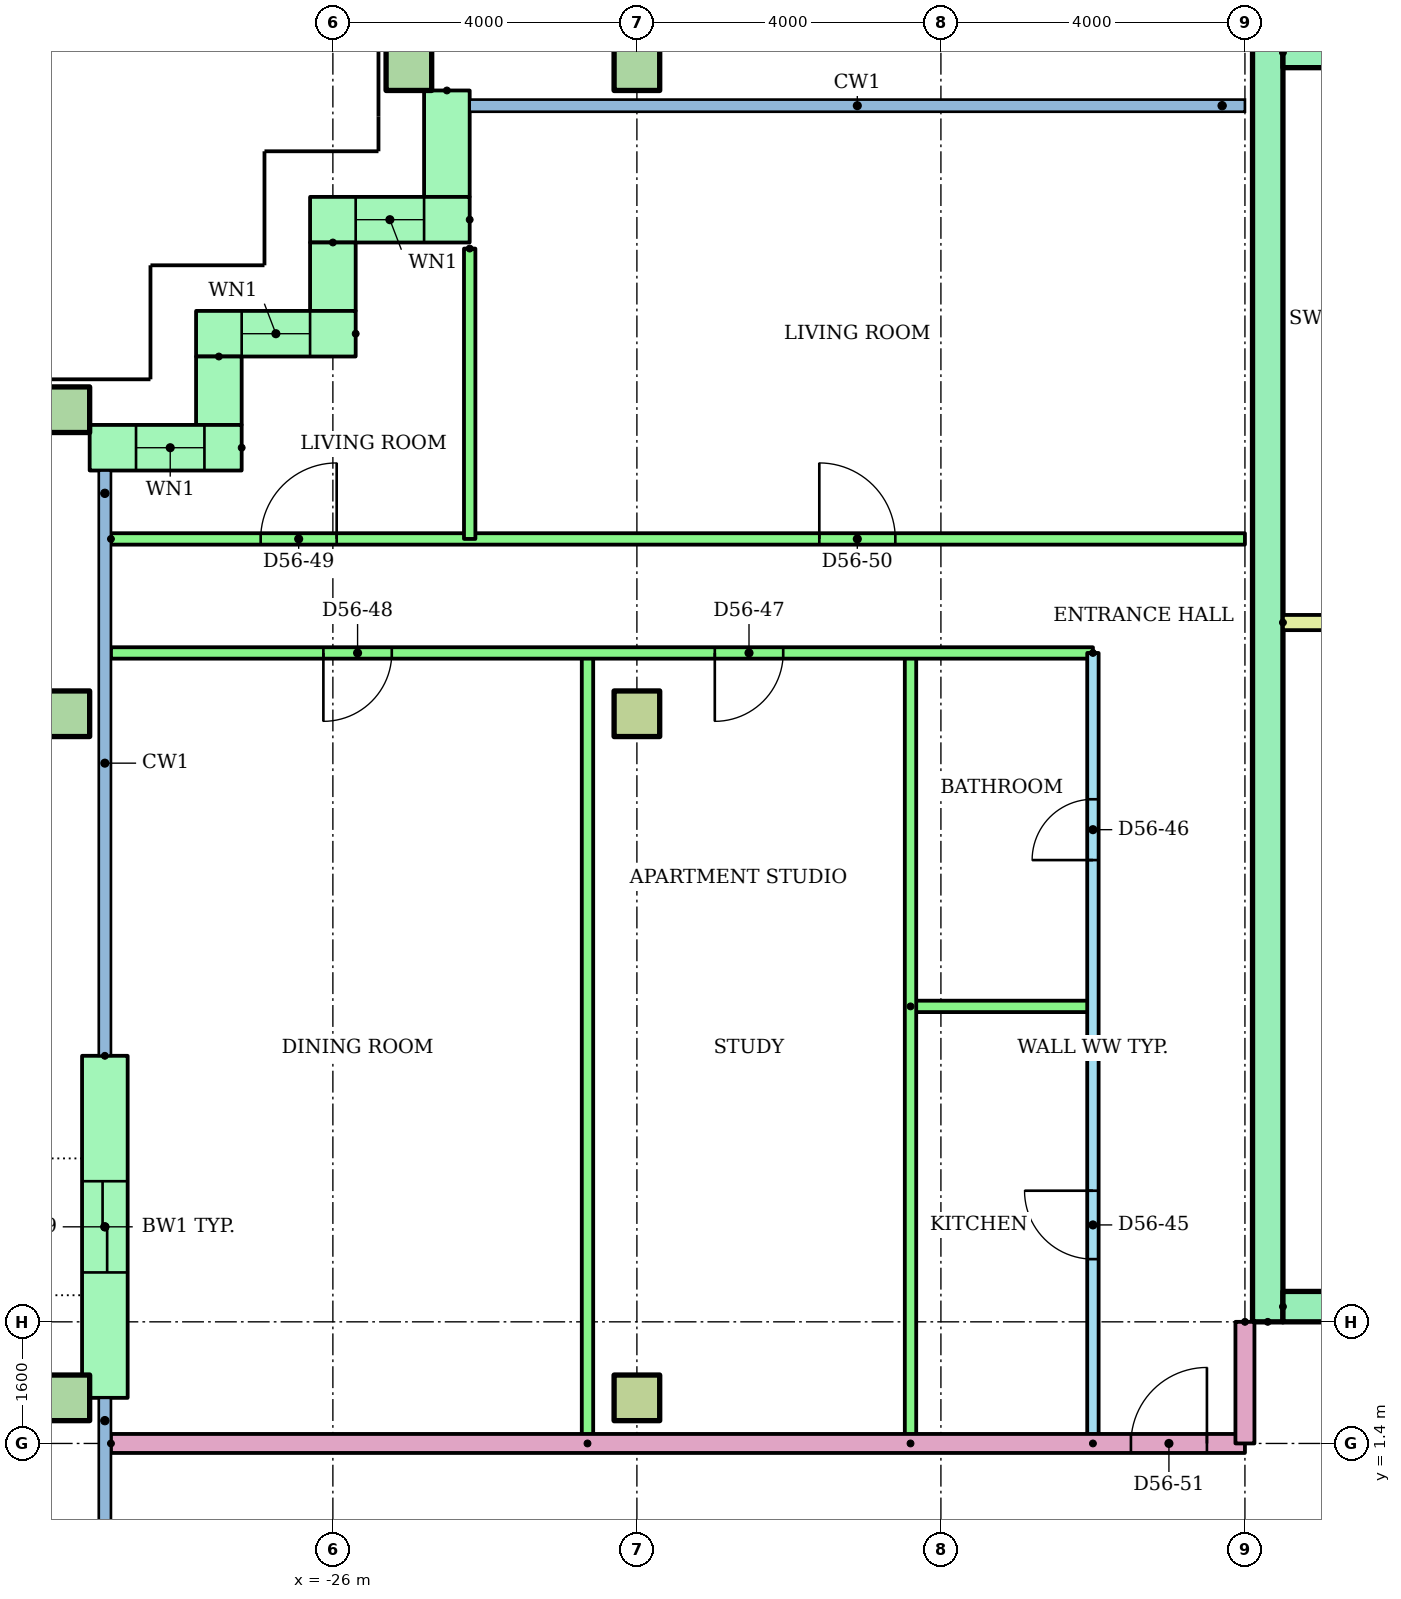
"""IFC4 building model, lengths in metres.
Left out: names, types, materials, properties, quantities, classifications, styles, units other than length and angle.
Written with IfcOpenShell. Run it as: python <this file> out.ifc"""

import sys

from ifc_helpers import new_model, si_unit, direction, frame, frame_2d, origin, origin_2d, place, context, subcontext, project, spatial, rectangle, hollow_rectangle, extrude, element, fill, save


model = new_model("IFC4")
c1 = context("Model", 3, precision=1e-05, world=origin(), true_north=direction((0.0, 1.0)))
c2 = subcontext(c1, "Body", "Model", "MODEL_VIEW")
j1 = project(units=[si_unit("LENGTHUNIT", "METRE"), si_unit("PLANEANGLEUNIT", "RADIAN")], contexts=[c1])
p1 = place(None, origin())
s1 = spatial("IfcSite", under=j1, at=p1, CompositionType="ELEMENT")
p2 = place(p1, origin())
s2 = spatial("IfcBuilding", under=s1, at=p2, CompositionType="ELEMENT")
p3 = place(p2, frame((0.0, 0.0, 217.2)))
s3 = spatial("IfcBuildingStorey", under=s2, at=p3, CompositionType="ELEMENT", Elevation=217.2)
p4 = place(p3, frame((-29.5, 2.0, 0.0)))
e1 = element("IfcColumn", 1, at=p4, inside=s3, PredefinedType="COLUMN", context=c2, shape_type="SweptSolid", body=[
    extrude(hollow_rectangle(XDim=0.6, YDim=0.6, WallThickness=0.03, at=origin_2d()), origin(), (0.0, 0.0, 1.0), 3.2),
])
p5 = place(p3, frame((-22.0, 2.0, 0.0)))
e2 = element("IfcColumn", 2, at=p5, inside=s3, PredefinedType="COLUMN", context=c2, shape_type="SweptSolid", body=[
    extrude(rectangle(XDim=0.6, YDim=0.6, at=origin_2d()), origin(), (0.0, 0.0, 1.0), 3.2),
])
p6 = place(p3, frame((-29.5, 11.0, 0.0)))
e3 = element("IfcColumn", 3, at=p6, inside=s3, PredefinedType="COLUMN", context=c2, shape_type="SweptSolid", body=[
    extrude(hollow_rectangle(XDim=0.6, YDim=0.6, WallThickness=0.03, at=origin_2d()), origin(), (0.0, 0.0, 1.0), 3.2),
])
p7 = place(p3, frame((-22.0, 11.0, 0.0)))
e4 = element("IfcColumn", 4, at=p7, inside=s3, PredefinedType="COLUMN", context=c2, shape_type="SweptSolid", body=[
    extrude(rectangle(XDim=0.6, YDim=0.6, at=origin_2d()), origin(), (0.0, 0.0, 1.0), 3.2),
])
for number, where in (
    (5, (-29.5, 15.0, 0.0)),
    (6, (-25.0, 19.5, 0.0)),
    (7, (-22.0, 19.5, 0.0)),
):
    element("IfcColumn", number, at=place(p3, frame(where)), inside=s3, PredefinedType="COLUMN", context=c2, shape_type="SweptSolid", body=[
        extrude(hollow_rectangle(XDim=0.6, YDim=0.6, WallThickness=0.03, at=origin_2d()), origin(), (0.0, 0.0, 1.0), 3.2),
    ])
p8 = place(p3, frame((-24.5, 19.2, 0.0), z_axis=(0.0, 0.0, 1.0), x_axis=(0.0, -1.0, 0.0)))
e8 = element("IfcWall", 8, at=p8, inside=s3, PredefinedType="STANDARD", context=c2, shape_type="SweptSolid", body=[
    extrude(rectangle(XDim=1.4, YDim=0.6, at=frame_2d((0.7, 0.0))), origin(), (0.0, 0.0, 1.0), 2.92),
])
p9 = place(p3, frame((-24.2, 17.5, 0.0), z_axis=(0.0, 0.0, 1.0), x_axis=(-1.0, 0.0, 0.0)))
e9 = element("IfcWall", 9, at=p9, inside=s3, PredefinedType="STANDARD", context=c2, shape_type="SweptSolid", body=[
    extrude(rectangle(XDim=2.1, YDim=0.6, at=frame_2d((1.05, 0.0))), origin(), (0.0, 0.0, 1.0), 2.92),
])
p10 = place(p9, frame((0.6, 0.0, 0.9)))
e10 = element("IfcOpeningElement", 10, at=p10, cuts=e9, PredefinedType="OPENING", context=c2, shape_type="SweptSolid", body=[
    extrude(rectangle(XDim=0.9, YDim=1.5, at=frame_2d((0.45, 0.75))), frame((0.0, 0.31, 0.0), z_axis=(0.0, -1.0, 0.0), x_axis=(1.0, 0.0, 0.0)), (0.0, 0.0, 1.0), 0.62),
])
p11 = place(p3, frame((-26.0, 17.2, 0.0), z_axis=(0.0, 0.0, 1.0), x_axis=(0.0, -1.0, 0.0)))
e11 = element("IfcWall", 11, at=p11, inside=s3, PredefinedType="STANDARD", context=c2, shape_type="SweptSolid", body=[
    extrude(rectangle(XDim=0.9, YDim=0.6, at=frame_2d((0.45, 0.0))), origin(), (0.0, 0.0, 1.0), 2.92),
])
p12 = place(p3, frame((-25.7, 16.0, 0.0), z_axis=(0.0, 0.0, 1.0), x_axis=(-1.0, 0.0, 0.0)))
e12 = element("IfcWall", 12, at=p12, inside=s3, PredefinedType="STANDARD", context=c2, shape_type="SweptSolid", body=[
    extrude(rectangle(XDim=2.1, YDim=0.6, at=frame_2d((1.05, 0.0))), origin(), (0.0, 0.0, 1.0), 2.92),
])
p13 = place(p12, frame((0.6, 0.0, 0.9)))
e13 = element("IfcOpeningElement", 13, at=p13, cuts=e12, PredefinedType="OPENING", context=c2, shape_type="SweptSolid", body=[
    extrude(rectangle(XDim=0.9, YDim=1.5, at=frame_2d((0.45, 0.75))), frame((0.0, 0.31, 0.0), z_axis=(0.0, -1.0, 0.0), x_axis=(1.0, 0.0, 0.0)), (0.0, 0.0, 1.0), 0.62),
])
p14 = place(p3, frame((-27.5, 15.7, 0.0), z_axis=(0.0, 0.0, 1.0), x_axis=(0.0, -1.0, 0.0)))
e14 = element("IfcWall", 14, at=p14, inside=s3, PredefinedType="STANDARD", context=c2, shape_type="SweptSolid", body=[
    extrude(rectangle(XDim=0.9, YDim=0.6, at=frame_2d((0.45, 0.0))), origin(), (0.0, 0.0, 1.0), 2.92),
])
p15 = place(p3, frame((-27.2, 14.5, 0.0), z_axis=(0.0, 0.0, 1.0), x_axis=(-1.0, 0.0, 0.0)))
e15 = element("IfcWall", 15, at=p15, inside=s3, PredefinedType="STANDARD", context=c2, shape_type="SweptSolid", body=[
    extrude(rectangle(XDim=2.0, YDim=0.6, at=frame_2d((1.0, 0.0))), origin(), (0.0, 0.0, 1.0), 2.92),
])
p16 = place(p15, frame((0.49, 0.0, 0.9)))
e16 = element("IfcOpeningElement", 16, at=p16, cuts=e15, PredefinedType="OPENING", context=c2, shape_type="SweptSolid", body=[
    extrude(rectangle(XDim=0.9, YDim=1.5, at=frame_2d((0.45, 0.75))), frame((0.0, 0.31, 0.0), z_axis=(0.0, -1.0, 0.0), x_axis=(1.0, 0.0, 0.0)), (0.0, 0.0, 1.0), 0.62),
])
p17 = place(p3, frame((-29.0, 6.5, 0.0), z_axis=(0.0, 0.0, 1.0), x_axis=(0.0, -1.0, 0.0)))
e17 = element("IfcWall", 17, at=p17, inside=s3, PredefinedType="STANDARD", context=c2, shape_type="SweptSolid", body=[
    extrude(rectangle(XDim=4.5, YDim=0.6, at=frame_2d((2.25, 0.0))), origin(), (0.0, 0.0, 1.0), 2.92),
])
p18 = place(p17, frame((1.65, 0.0, 0.0)))
e18 = element("IfcOpeningElement", 18, at=p18, cuts=e17, PredefinedType="OPENING", context=c2, shape_type="SweptSolid", body=[
    extrude(rectangle(XDim=1.2, YDim=2.1, at=frame_2d((0.6, 1.05))), frame((0.0, 0.31, 0.0), z_axis=(0.0, -1.0, 0.0), x_axis=(1.0, 0.0, 0.0)), (0.0, 0.0, 1.0), 0.62),
])
p19 = place(p3, frame((-13.7, 3.0, 0.0), z_axis=(0.0, 0.0, 1.0), x_axis=(0.0, 1.0, 0.0)))
e19 = element("IfcWall", 19, at=p19, inside=s3, PredefinedType="SHEAR", context=c2, shape_type="SweptSolid", body=[
    extrude(rectangle(XDim=17.0, YDim=0.4, at=frame_2d((8.5, 0.0))), origin(), (0.0, 0.0, 1.0), 2.92),
])
p20 = place(p3, frame((-13.5, 19.7, 0.0)))
e20 = element("IfcWall", 20, at=p20, inside=s3, PredefinedType="SHEAR", context=c2, shape_type="SweptSolid", body=[
    extrude(rectangle(XDim=27.0, YDim=0.4, at=frame_2d((13.5, 0.0))), origin(), (0.0, 0.0, 1.0), 2.92),
])
p21 = place(p3, frame((-13.5, 3.2, 0.0)))
e21 = element("IfcWall", 21, at=p21, inside=s3, PredefinedType="SHEAR", context=c2, shape_type="SweptSolid", body=[
    extrude(rectangle(XDim=27.0, YDim=0.4, at=frame_2d((13.5, 0.0))), origin(), (0.0, 0.0, 1.0), 2.92),
])
p22 = place(p21, frame((22.083, 0.0, 0.0)))
e22 = element("IfcOpeningElement", 22, at=p22, cuts=e21, PredefinedType="OPENING", context=c2, shape_type="SweptSolid", body=[
    extrude(rectangle(XDim=1.1, YDim=2.1, at=frame_2d((0.55, 1.05))), frame((0.0, 0.21, 0.0), z_axis=(0.0, -1.0, 0.0), x_axis=(1.0, 0.0, 0.0)), (0.0, 0.0, 1.0), 0.42),
])
p23 = place(p21, frame((25.128, 0.0, 0.0)))
e23 = element("IfcOpeningElement", 23, at=p23, cuts=e21, PredefinedType="OPENING", context=c2, shape_type="SweptSolid", body=[
    extrude(rectangle(XDim=1.1, YDim=2.1, at=frame_2d((0.55, 1.05))), frame((0.0, 0.21, 0.0), z_axis=(0.0, -1.0, 0.0), x_axis=(1.0, 0.0, 0.0)), (0.0, 0.0, 1.0), 0.42),
])
p24 = place(p21, frame((12.6, 0.0, 0.0)))
e24 = element("IfcOpeningElement", 24, at=p24, cuts=e21, PredefinedType="OPENING", context=c2, shape_type="SweptSolid", body=[
    extrude(rectangle(XDim=1.8, YDim=2.1, at=frame_2d((0.9, 1.05))), frame((0.0, 0.21, 0.0), z_axis=(0.0, -1.0, 0.0), x_axis=(1.0, 0.0, 0.0)), (0.0, 0.0, 1.0), 0.42),
])
p25 = place(p3, frame((-13.5, 12.2, 0.0)))
e25 = element("IfcWall", 25, at=p25, inside=s3, PredefinedType="PARTITIONING", context=c2, shape_type="SweptSolid", body=[
    extrude(rectangle(XDim=3.9, YDim=0.2, at=frame_2d((1.95, 0.0))), origin(), (0.0, 0.0, 1.0), 2.92),
])
p26 = place(p3, frame((-16.0, 1.4, 0.0), z_axis=(0.0, 0.0, 1.0), x_axis=(0.0, 1.0, 0.0)))
e26 = element("IfcWall", 26, at=p26, inside=s3, PredefinedType="PARTITIONING", context=c2, shape_type="SweptSolid", body=[
    extrude(rectangle(XDim=10.4, YDim=0.15, at=frame_2d((5.2, 0.0))), origin(), (0.0, 0.0, 1.0), 2.4),
])
p27 = place(p26, frame((2.425, 0.0, 0.0)))
e27 = element("IfcOpeningElement", 27, at=p27, cuts=e26, PredefinedType="OPENING", context=c2, shape_type="SweptSolid", body=[
    extrude(rectangle(XDim=0.9, YDim=2.1, at=frame_2d((0.45, 1.05))), frame((0.0, 0.085, 0.0), z_axis=(0.0, -1.0, 0.0), x_axis=(1.0, 0.0, 0.0)), (0.0, 0.0, 1.0), 0.17),
])
p28 = place(p26, frame((7.675, 0.0, 0.0)))
e28 = element("IfcOpeningElement", 28, at=p28, cuts=e26, PredefinedType="OPENING", context=c2, shape_type="SweptSolid", body=[
    extrude(rectangle(XDim=0.8, YDim=2.1, at=frame_2d((0.4, 1.05))), frame((0.0, 0.085, 0.0), z_axis=(0.0, -1.0, 0.0), x_axis=(1.0, 0.0, 0.0)), (0.0, 0.0, 1.0), 0.17),
])
p29 = place(p3, frame((-18.4, 7.15, 0.0)))
e29 = element("IfcWall", 29, at=p29, inside=s3, PredefinedType="PARTITIONING", context=c2, shape_type="SweptSolid", body=[
    extrude(rectangle(XDim=2.4, YDim=0.15, at=frame_2d((1.2, 0.0))), origin(), (0.0, 0.0, 1.0), 2.4),
])
for number, where, z_axis, x_axis in (
    (30, (-18.4, 1.4, 0.0), (0.0, 0.0, 1.0), (0.0, 1.0, 0.0)),
    (31, (-22.65, 1.4, 0.0), (0.0, 0.0, 1.0), (0.0, 1.0, 0.0)),
):
    element("IfcWall", number, at=place(p3, frame(where, z_axis=z_axis, x_axis=x_axis)), inside=s3, PredefinedType="PARTITIONING", context=c2, shape_type="SweptSolid", body=[
        extrude(rectangle(XDim=10.4, YDim=0.15, at=frame_2d((5.2, 0.0))), origin(), (0.0, 0.0, 1.0), 2.4),
    ])
p30 = place(p3, frame((-16.0, 11.8, 0.0), z_axis=(0.0, 0.0, 1.0), x_axis=(-1.0, 0.0, 0.0)))
e32 = element("IfcWall", 32, at=p30, inside=s3, PredefinedType="PARTITIONING", context=c2, shape_type="SweptSolid", body=[
    extrude(rectangle(XDim=12.92, YDim=0.15, at=frame_2d((6.46, 0.0))), origin(), (0.0, 0.0, 1.0), 2.4),
])
p31 = place(p30, frame((4.075, 0.0, 0.0)))
e33 = element("IfcOpeningElement", 33, at=p31, cuts=e32, PredefinedType="OPENING", context=c2, shape_type="SweptSolid", body=[
    extrude(rectangle(XDim=0.9, YDim=2.1, at=frame_2d((0.45, 1.05))), frame((0.0, 0.085, 0.0), z_axis=(0.0, -1.0, 0.0), x_axis=(1.0, 0.0, 0.0)), (0.0, 0.0, 1.0), 0.17),
])
p32 = place(p30, frame((9.225, 0.0, 0.0)))
e34 = element("IfcOpeningElement", 34, at=p32, cuts=e32, PredefinedType="OPENING", context=c2, shape_type="SweptSolid", body=[
    extrude(rectangle(XDim=0.9, YDim=2.1, at=frame_2d((0.45, 1.05))), frame((0.0, 0.085, 0.0), z_axis=(0.0, -1.0, 0.0), x_axis=(1.0, 0.0, 0.0)), (0.0, 0.0, 1.0), 0.17),
])
p33 = place(p3, frame((-28.92, 13.3, 0.0)))
e35 = element("IfcWall", 35, at=p33, inside=s3, PredefinedType="PARTITIONING", context=c2, shape_type="SweptSolid", body=[
    extrude(rectangle(XDim=14.92, YDim=0.15, at=frame_2d((7.46, 0.0))), origin(), (0.0, 0.0, 1.0), 2.4),
])
p34 = place(p33, frame((1.97, 0.0, 0.0)))
e36 = element("IfcOpeningElement", 36, at=p34, cuts=e35, PredefinedType="OPENING", context=c2, shape_type="SweptSolid", body=[
    extrude(rectangle(XDim=1.0, YDim=2.1, at=frame_2d((0.5, 1.05))), frame((0.0, 0.085, 0.0), z_axis=(0.0, -1.0, 0.0), x_axis=(1.0, 0.0, 0.0)), (0.0, 0.0, 1.0), 0.17),
])
p35 = place(p33, frame((9.32, 0.0, 0.0)))
e37 = element("IfcOpeningElement", 37, at=p35, cuts=e35, PredefinedType="OPENING", context=c2, shape_type="SweptSolid", body=[
    extrude(rectangle(XDim=1.0, YDim=2.1, at=frame_2d((0.5, 1.05))), frame((0.0, 0.085, 0.0), z_axis=(0.0, -1.0, 0.0), x_axis=(1.0, 0.0, 0.0)), (0.0, 0.0, 1.0), 0.17),
])
p36 = place(p3, frame((-24.2, 17.12, 0.0), z_axis=(0.0, 0.0, 1.0), x_axis=(0.0, -1.0, 0.0)))
e38 = element("IfcWall", 38, at=p36, inside=s3, PredefinedType="PARTITIONING", context=c2, shape_type="SweptSolid", body=[
    extrude(rectangle(XDim=3.82, YDim=0.15, at=frame_2d((1.91, 0.0))), origin(), (0.0, 0.0, 1.0), 2.4),
])
p37 = place(p3, frame((-28.92, 1.4, 0.0)))
e39 = element("IfcWall", 39, at=p37, inside=s3, PredefinedType="PARTITIONING", context=c2, shape_type="SweptSolid", body=[
    extrude(rectangle(XDim=14.92, YDim=0.25, at=frame_2d((7.46, 0.0))), origin(), (0.0, 0.0, 1.0), 2.4),
])
p38 = place(p37, frame((13.42, 0.0, 0.0)))
e40 = element("IfcOpeningElement", 40, at=p38, cuts=e39, PredefinedType="OPENING", context=c2, shape_type="SweptSolid", body=[
    extrude(rectangle(XDim=1.0, YDim=2.1, at=frame_2d((0.5, 1.05))), frame((0.0, 0.135, 0.0), z_axis=(0.0, -1.0, 0.0), x_axis=(1.0, 0.0, 0.0)), (0.0, 0.0, 1.0), 0.27),
])
p39 = place(p3, frame((-14.0, 3.0, 0.0), z_axis=(0.0, 0.0, 1.0), x_axis=(0.0, -1.0, 0.0)))
e41 = element("IfcWall", 41, at=p39, inside=s3, PredefinedType="PARTITIONING", context=c2, shape_type="SweptSolid", body=[
    extrude(rectangle(XDim=1.6, YDim=0.25, at=frame_2d((0.8, 0.0))), origin(), (0.0, 0.0, 1.0), 2.4),
])
p40 = place(p10, origin())
e42 = element("IfcWindow", 42, at=p40, inside=s3, PartitioningType="SINGLE_PANEL", PredefinedType="WINDOW", context=c2, shape_type="SweptSolid", body=[
    extrude(rectangle(XDim=0.9, YDim=1.5, at=frame_2d((0.45, 0.75))), frame((0.0, 0.03, 0.0), z_axis=(0.0, -1.0, 0.0), x_axis=(1.0, 0.0, 0.0)), (0.0, 0.0, 1.0), 0.06),
])
fill(e10, e42)
p41 = place(p13, origin())
e43 = element("IfcWindow", 43, at=p41, inside=s3, PartitioningType="SINGLE_PANEL", PredefinedType="WINDOW", context=c2, shape_type="SweptSolid", body=[
    extrude(rectangle(XDim=0.9, YDim=1.5, at=frame_2d((0.45, 0.75))), frame((0.0, 0.03, 0.0), z_axis=(0.0, -1.0, 0.0), x_axis=(1.0, 0.0, 0.0)), (0.0, 0.0, 1.0), 0.06),
])
fill(e13, e43)
p42 = place(p16, origin())
e44 = element("IfcWindow", 44, at=p42, inside=s3, PartitioningType="SINGLE_PANEL", PredefinedType="WINDOW", context=c2, shape_type="SweptSolid", body=[
    extrude(rectangle(XDim=0.9, YDim=1.5, at=frame_2d((0.45, 0.75))), frame((0.0, 0.03, 0.0), z_axis=(0.0, -1.0, 0.0), x_axis=(1.0, 0.0, 0.0)), (0.0, 0.0, 1.0), 0.06),
])
fill(e16, e44)
p43 = place(p27, origin())
e45 = element("IfcDoor", 45, at=p43, inside=s3, OperationType="SINGLE_SWING_RIGHT", PredefinedType="DOOR", context=c2, shape_type="SweptSolid", body=[
    extrude(rectangle(XDim=0.9, YDim=2.1, at=frame_2d((0.45, 1.05))), frame((0.0, 0.025, 0.0), z_axis=(0.0, -1.0, 0.0), x_axis=(1.0, 0.0, 0.0)), (0.0, 0.0, 1.0), 0.05),
])
fill(e27, e45)
p44 = place(p28, origin())
e46 = element("IfcDoor", 46, at=p44, inside=s3, OperationType="SINGLE_SWING_LEFT", PredefinedType="DOOR", context=c2, shape_type="SweptSolid", body=[
    extrude(rectangle(XDim=0.8, YDim=2.1, at=frame_2d((0.4, 1.05))), frame((0.0, 0.025, 0.0), z_axis=(0.0, -1.0, 0.0), x_axis=(1.0, 0.0, 0.0)), (0.0, 0.0, 1.0), 0.05),
])
fill(e28, e46)
p45 = place(p31, origin())
e47 = element("IfcDoor", 47, at=p45, inside=s3, OperationType="SINGLE_SWING_RIGHT", PredefinedType="DOOR", context=c2, shape_type="SweptSolid", body=[
    extrude(rectangle(XDim=0.9, YDim=2.1, at=frame_2d((0.45, 1.05))), frame((0.0, 0.025, 0.0), z_axis=(0.0, -1.0, 0.0), x_axis=(1.0, 0.0, 0.0)), (0.0, 0.0, 1.0), 0.05),
])
fill(e33, e47)
p46 = place(p32, origin())
e48 = element("IfcDoor", 48, at=p46, inside=s3, OperationType="SINGLE_SWING_RIGHT", PredefinedType="DOOR", context=c2, shape_type="SweptSolid", body=[
    extrude(rectangle(XDim=0.9, YDim=2.1, at=frame_2d((0.45, 1.05))), frame((0.0, 0.025, 0.0), z_axis=(0.0, -1.0, 0.0), x_axis=(1.0, 0.0, 0.0)), (0.0, 0.0, 1.0), 0.05),
])
fill(e34, e48)
p47 = place(p34, origin())
e49 = element("IfcDoor", 49, at=p47, inside=s3, OperationType="SINGLE_SWING_RIGHT", PredefinedType="DOOR", context=c2, shape_type="SweptSolid", body=[
    extrude(rectangle(XDim=1.0, YDim=2.1, at=frame_2d((0.5, 1.05))), frame((0.0, 0.025, 0.0), z_axis=(0.0, -1.0, 0.0), x_axis=(1.0, 0.0, 0.0)), (0.0, 0.0, 1.0), 0.05),
])
fill(e36, e49)
p48 = place(p35, origin())
e50 = element("IfcDoor", 50, at=p48, inside=s3, OperationType="SINGLE_SWING_LEFT", PredefinedType="DOOR", context=c2, shape_type="SweptSolid", body=[
    extrude(rectangle(XDim=1.0, YDim=2.1, at=frame_2d((0.5, 1.05))), frame((0.0, 0.025, 0.0), z_axis=(0.0, -1.0, 0.0), x_axis=(1.0, 0.0, 0.0)), (0.0, 0.0, 1.0), 0.05),
])
fill(e37, e50)
p49 = place(p38, origin())
e51 = element("IfcDoor", 51, at=p49, inside=s3, OperationType="SINGLE_SWING_RIGHT", PredefinedType="DOOR", context=c2, shape_type="SweptSolid", body=[
    extrude(rectangle(XDim=1.0, YDim=2.1, at=frame_2d((0.5, 1.05))), frame((0.0, 0.025, 0.0), z_axis=(0.0, -1.0, 0.0), x_axis=(1.0, 0.0, 0.0)), (0.0, 0.0, 1.0), 0.05),
])
fill(e40, e51)
p50 = place(p18, origin())
e52 = element("IfcDoor", 52, at=p50, inside=s3, OperationType="SLIDING_TO_LEFT", PredefinedType="DOOR", context=c2, shape_type="SweptSolid", body=[
    extrude(rectangle(XDim=1.2, YDim=2.1, at=frame_2d((0.6, 1.05))), frame((0.0, 0.025, 0.0), z_axis=(0.0, -1.0, 0.0), x_axis=(1.0, 0.0, 0.0)), (0.0, 0.0, 1.0), 0.05),
])
fill(e18, e52)
save(model, sys.argv[1])
